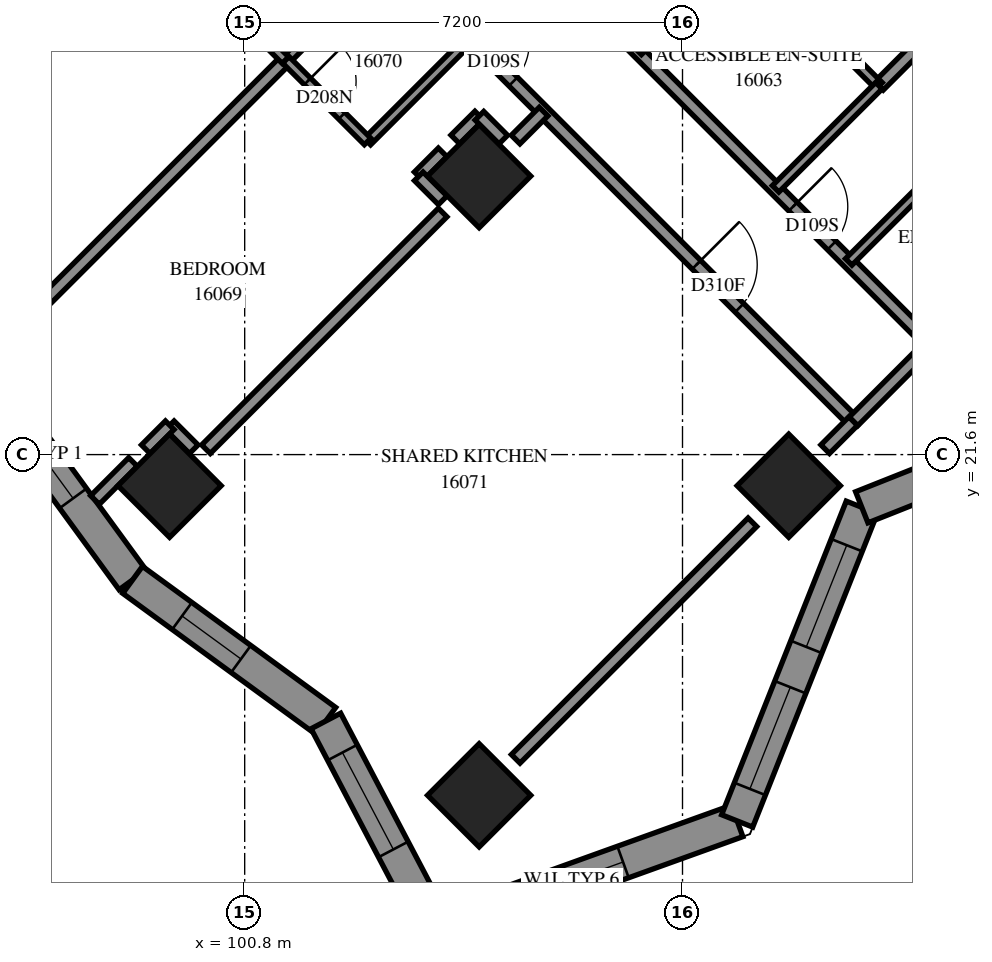
"""IFC4 building model, lengths in metres.
Left out: names, types, materials, properties, quantities, classifications, styles, units other than length and angle.
Written with IfcOpenShell. Run it as: python <this file> out.ifc"""

import sys

from ifc_helpers import new_model, si_unit, direction, frame, frame_2d, origin, origin_2d, place, context, subcontext, project, spatial, polyline, rectangle, outline, extrude, element, fill, save


model = new_model("IFC4")
c1 = context("Model", 3, precision=1e-05, world=origin(), true_north=direction((0.0, 1.0)))
c2 = subcontext(c1, "Body", "Model", "MODEL_VIEW")
j1 = project(units=[si_unit("LENGTHUNIT", "METRE"), si_unit("PLANEANGLEUNIT", "RADIAN")], contexts=[c1])
p1 = place(None, origin())
s1 = spatial("IfcSite", under=j1, at=p1, CompositionType="ELEMENT")
p2 = place(p1, origin())
s2 = spatial("IfcBuilding", under=s1, at=p2, CompositionType="ELEMENT")
p3 = place(p2, frame((0.0, 0.0, 61.0)))
s3 = spatial("IfcBuildingStorey", under=s2, at=p3, CompositionType="ELEMENT", Elevation=61.0)
for number, where, z_axis, x_axis in (
    (1, (104.656, 26.18, 0.0), (0.0, 0.0, 1.0), (0.707, -0.707, 0.0)),
    (2, (99.565, 21.088, 0.0), (0.0, 0.0, 1.0), (0.707, -0.707, 0.0)),
    (3, (109.747, 21.088, 0.0), (0.0, 0.0, 1.0), (0.707, -0.707, 0.0)),
    (4, (104.656, 15.997, 0.0), (0.0, 0.0, 1.0), (0.707, -0.707, 0.0)),
):
    element("IfcColumn", number, at=place(p3, frame(where, z_axis=z_axis, x_axis=x_axis)), inside=s3, PredefinedType="COLUMN", context=c2, shape_type="SweptSolid", body=[
        extrude(rectangle(XDim=1.2, YDim=1.2, at=origin_2d()), origin(), (0.0, 0.0, 1.0), 3.1),
    ])
p4 = place(p3, frame((103.937, 13.789, 0.0), z_axis=(0.0, 0.0, 1.0), x_axis=(0.9408704904, 0.3387664688, 0.0)))
e5 = element("IfcWall", 5, at=p4, inside=s3, PredefinedType="SOLIDWALL", context=c2, shape_type="SweptSolid", body=[
    extrude(outline(polyline([(-0.239, -0.275), (5.398, -0.275), (5.15, 0.275), (0.239, 0.275), (-0.239, -0.275)])), origin(), (0.0, 0.0, 1.0), 2.6),
])
p5 = place(p4, frame((1.479, 0.0, 0.6)))
e6 = element("IfcOpeningElement", 6, at=p5, cuts=e5, PredefinedType="OPENING", context=c2, shape_type="SweptSolid", body=[
    extrude(rectangle(XDim=1.8, YDim=1.9, at=frame_2d((0.9, 0.95))), frame((0.0, 0.285, 0.0), z_axis=(0.0, -1.0, 0.0), x_axis=(1.0, 0.0, 0.0)), (0.0, 0.0, 1.0), 0.57),
])
p6 = place(p3, frame((108.899, 15.576, 0.0), z_axis=(0.0, 0.0, 1.0), x_axis=(0.3692522262, 0.9293292169, 0.0)))
e7 = element("IfcWall", 7, at=p6, inside=s3, PredefinedType="SOLIDWALL", context=c2, shape_type="SweptSolid", body=[
    extrude(outline(polyline([(-0.124, -0.275), (5.431, -0.275), (5.668, 0.275), (0.124, 0.275), (-0.124, -0.275)])), origin(), (0.0, 0.0, 1.0), 3.1),
])
p7 = place(p6, frame((0.566, 0.0, 0.6)))
e8 = element("IfcOpeningElement", 8, at=p7, cuts=e7, PredefinedType="OPENING", context=c2, shape_type="SweptSolid", body=[
    extrude(rectangle(XDim=1.8, YDim=1.9, at=frame_2d((0.9, 0.95))), frame((0.0, 0.285, 0.0), z_axis=(0.0, -1.0, 0.0), x_axis=(1.0, 0.0, 0.0)), (0.0, 0.0, 1.0), 0.57),
])
p8 = place(p6, frame((3.079, 0.0, 0.6)))
e9 = element("IfcOpeningElement", 9, at=p8, cuts=e7, PredefinedType="OPENING", context=c2, shape_type="SweptSolid", body=[
    extrude(rectangle(XDim=1.8, YDim=1.9, at=frame_2d((0.9, 0.95))), frame((0.0, 0.285, 0.0), z_axis=(0.0, -1.0, 0.0), x_axis=(1.0, 0.0, 0.0)), (0.0, 0.0, 1.0), 0.57),
])
p9 = place(p3, frame((110.948, 20.733, 0.0), z_axis=(0.0, 0.0, 1.0), x_axis=(0.9293292169, 0.3692522262, 0.0)))
e10 = element("IfcWall", 10, at=p9, inside=s3, PredefinedType="SOLIDWALL", context=c2, shape_type="SweptSolid", body=[
    extrude(outline(polyline([(0.119, -0.275), (5.674, -0.275), (5.426, 0.275), (-0.119, 0.275), (0.119, -0.275)])), origin(), (0.0, 0.0, 1.0), 3.1),
])
p10 = place(p9, frame((1.238, 0.0, 0.5)))
e11 = element("IfcOpeningElement", 11, at=p10, cuts=e10, PredefinedType="OPENING", context=c2, shape_type="SweptSolid", body=[
    extrude(rectangle(XDim=2.8, YDim=2.45, at=frame_2d((1.4, 1.225))), frame((0.0, 0.285, 0.0), z_axis=(0.0, -1.0, 0.0), x_axis=(1.0, 0.0, 0.0)), (0.0, 0.0, 1.0), 0.57),
])
p11 = place(p3, frame((96.648, 22.701, 0.0), z_axis=(0.0, 0.0, 1.0), x_axis=(0.5897321582, -0.807598899, 0.0)))
e12 = element("IfcWall", 12, at=p11, inside=s3, PredefinedType="SOLIDWALL", context=c2, shape_type="SweptSolid", body=[
    extrude(outline(polyline([(0.043, -0.275), (3.957, -0.275), (3.871, 0.275), (-0.043, 0.275), (0.043, -0.275)])), origin(), (0.0, 0.0, 1.0), 3.1),
])
p12 = place(p11, frame((0.455, 0.0, 0.7)))
e13 = element("IfcOpeningElement", 13, at=p12, cuts=e12, PredefinedType="OPENING", context=c2, shape_type="SweptSolid", body=[
    extrude(rectangle(XDim=1.8, YDim=2.2, at=frame_2d((0.9, 1.1))), frame((0.0, 0.285, 0.0), z_axis=(0.0, -1.0, 0.0), x_axis=(1.0, 0.0, 0.0)), (0.0, 0.0, 1.0), 0.57),
])
p13 = place(p3, frame((98.957, 19.54, 0.0), z_axis=(0.0, 0.0, 1.0), x_axis=(0.8076038454, -0.5897253843, 0.0)))
e14 = element("IfcWall", 14, at=p13, inside=s3, PredefinedType="SOLIDWALL", context=c2, shape_type="SweptSolid", body=[
    extrude(outline(polyline([(-0.043, -0.275), (3.871, -0.275), (3.999, 0.275), (0.043, 0.275), (-0.043, -0.275)])), origin(), (0.0, 0.0, 1.0), 3.1),
])
p14 = place(p13, frame((1.007, 0.0, 0.5)))
e15 = element("IfcOpeningElement", 15, at=p14, cuts=e14, PredefinedType="OPENING", context=c2, shape_type="SweptSolid", body=[
    extrude(rectangle(XDim=1.2, YDim=2.45, at=frame_2d((0.6, 1.225))), frame((0.0, 0.285, 0.0), z_axis=(0.0, -1.0, 0.0), x_axis=(1.0, 0.0, 0.0)), (0.0, 0.0, 1.0), 0.57),
])
p15 = place(p3, frame((102.135, 17.219, 0.0), z_axis=(0.0, 0.0, 1.0), x_axis=(0.4651676913, -0.8852225816, 0.0)))
e16 = element("IfcWall", 16, at=p15, inside=s3, PredefinedType="SOLIDWALL", context=c2, shape_type="SweptSolid", body=[
    extrude(outline(polyline([(0.064, -0.275), (4.114, -0.275), (3.635, 0.275), (-0.064, 0.275), (0.064, -0.275)])), origin(), (0.0, 0.0, 1.0), 2.6),
])
p16 = place(p15, frame((0.586, 0.0, 0.6)))
e17 = element("IfcOpeningElement", 17, at=p16, cuts=e16, PredefinedType="OPENING", context=c2, shape_type="SweptSolid", body=[
    extrude(rectangle(XDim=1.8, YDim=1.9, at=frame_2d((0.9, 0.95))), frame((0.0, 0.285, 0.0), z_axis=(0.0, -1.0, 0.0), x_axis=(1.0, 0.0, 0.0)), (0.0, 0.0, 1.0), 0.57),
])
p17 = place(p3, frame((101.825, 31.125, 0.0), z_axis=(0.0, 0.0, 1.0), x_axis=(0.7071067812, -0.7071067812, 0.0)))
e18 = element("IfcWall", 18, at=p17, inside=s3, PredefinedType="PARTITIONING", context=c2, shape_type="SweptSolid", body=[
    extrude(rectangle(XDim=12.7, YDim=0.2, at=frame_2d((6.35, 0.0))), origin(), (0.0, 0.0, 1.0), 3.1),
])
p18 = place(p17, frame((3.895, 0.0, 0.0)))
e19 = element("IfcOpeningElement", 19, at=p18, cuts=e18, PredefinedType="OPENING", context=c2, shape_type="SweptSolid", body=[
    extrude(rectangle(XDim=0.9, YDim=2.1, at=frame_2d((0.45, 1.05))), frame((0.0, 0.11, 0.0), z_axis=(0.0, -1.0, 0.0), x_axis=(1.0, 0.0, 0.0)), (0.0, 0.0, 1.0), 0.22),
])
p19 = place(p17, frame((9.056, 0.0, 0.0)))
e20 = element("IfcOpeningElement", 20, at=p19, cuts=e18, PredefinedType="OPENING", context=c2, shape_type="SweptSolid", body=[
    extrude(rectangle(XDim=1.0, YDim=2.1, at=frame_2d((0.5, 1.05))), frame((0.0, 0.11, 0.0), z_axis=(0.0, -1.0, 0.0), x_axis=(1.0, 0.0, 0.0)), (0.0, 0.0, 1.0), 0.22),
])
p20 = place(p3, frame((106.987, 28.509, 0.0), z_axis=(0.0, 0.0, 1.0), x_axis=(0.7071067812, -0.7071067812, 0.0)))
e21 = element("IfcWall", 21, at=p20, inside=s3, PredefinedType="PARTITIONING", context=c2, shape_type="SweptSolid", body=[
    extrude(rectangle(XDim=7.198, YDim=0.2, at=frame_2d((3.599, 0.0))), origin(), (0.0, 0.0, 1.0), 3.1),
])
p21 = place(p20, frame((4.004, 0.0, 0.0)))
e22 = element("IfcOpeningElement", 22, at=p21, cuts=e21, PredefinedType="OPENING", context=c2, shape_type="SweptSolid", body=[
    extrude(rectangle(XDim=0.9, YDim=2.1, at=frame_2d((0.45, 1.05))), frame((0.0, 0.11, 0.0), z_axis=(0.0, -1.0, 0.0), x_axis=(1.0, 0.0, 0.0)), (0.0, 0.0, 1.0), 0.22),
])
p22 = place(p3, frame((96.519, 23.136, 0.0), z_axis=(0.0, 0.0, 1.0), x_axis=(0.7071067812, 0.7071067812, 0.0)))
e23 = element("IfcWall", 23, at=p22, inside=s3, PredefinedType="PARTITIONING", context=c2, shape_type="SweptSolid", body=[
    extrude(rectangle(XDim=7.005, YDim=0.2, at=frame_2d((3.503, 0.0))), origin(), (0.0, 0.0, 1.0), 3.1),
])
p23 = place(p3, frame((100.163, 21.689, 0.0), z_axis=(0.0, 0.0, 1.0), x_axis=(0.7071067812, 0.7071067812, 0.0)))
e24 = element("IfcWall", 24, at=p23, inside=s3, PredefinedType="PARTITIONING", context=c2, shape_type="SweptSolid", body=[
    extrude(rectangle(XDim=5.504, YDim=0.2, at=frame_2d((2.752, 0.0))), origin(), (0.0, 0.0, 1.0), 3.1),
])
p24 = place(p3, frame((105.257, 16.597, 0.0), z_axis=(0.0, 0.0, 1.0), x_axis=(0.7072884866, 0.706925029, 0.0)))
e25 = element("IfcWall", 25, at=p24, inside=s3, PredefinedType="PARTITIONING", context=c2, shape_type="SweptSolid", body=[
    extrude(rectangle(XDim=5.503, YDim=0.2, at=frame_2d((2.751, 0.0))), origin(), (0.0, 0.0, 1.0), 2.6),
])
p25 = place(p3, frame((111.231, 27.665, 0.0), z_axis=(0.0, 0.0, 1.0), x_axis=(0.7071067812, 0.7071067812, 0.0)))
e26 = element("IfcWall", 26, at=p25, inside=s3, PredefinedType="PARTITIONING", context=c2, shape_type="SweptSolid", body=[
    extrude(rectangle(XDim=4.55, YDim=0.2, at=frame_2d((2.275, 0.0))), origin(), (0.0, 0.0, 1.0), 3.1),
])
p26 = place(p3, frame((108.97, 29.928, 0.0), z_axis=(0.0, 0.0, 1.0), x_axis=(0.7067942478, -0.7074191764, 0.0)))
e27 = element("IfcWall", 27, at=p26, inside=s3, PredefinedType="PARTITIONING", context=c2, shape_type="SweptSolid", body=[
    extrude(rectangle(XDim=3.2, YDim=0.15, at=frame_2d((1.6, 0.0))), origin(), (0.0, 0.0, 1.0), 3.1),
])
p27 = place(p26, frame((1.148, 0.0, 0.0)))
e28 = element("IfcOpeningElement", 28, at=p27, cuts=e27, PredefinedType="OPENING", context=c2, shape_type="SweptSolid", body=[
    extrude(rectangle(XDim=0.8, YDim=2.1, at=frame_2d((0.4, 1.05))), frame((0.0, 0.085, 0.0), z_axis=(0.0, -1.0, 0.0), x_axis=(1.0, 0.0, 0.0)), (0.0, 0.0, 1.0), 0.17),
])
p28 = place(p3, frame((107.271, 28.231, 0.0), z_axis=(0.0, 0.0, 1.0), x_axis=(0.7071067812, 0.7071067812, 0.0)))
e29 = element("IfcWall", 29, at=p28, inside=s3, PredefinedType="PARTITIONING", context=c2, shape_type="SweptSolid", body=[
    extrude(rectangle(XDim=2.401, YDim=0.15, at=frame_2d((1.201, 0.0))), origin(), (0.0, 0.0, 1.0), 3.1),
])
for number, where, z_axis, x_axis in (
    (30, (101.477, 28.085, 0.0), (0.0, 0.0, 1.0), (0.707, 0.708, 0.0)),
    (31, (109.531, 25.971, 0.0), (0.0, 0.0, 1.0), (0.708, 0.707, 0.0)),
    (32, (110.734, 24.768, 0.0), (0.0, 0.0, 1.0), (0.708, 0.707, 0.0)),
):
    element("IfcWall", number, at=place(p3, frame(where, z_axis=z_axis, x_axis=x_axis)), inside=s3, PredefinedType="PARTITIONING", context=c2, shape_type="SweptSolid", body=[
        extrude(rectangle(XDim=2.4, YDim=0.15, at=frame_2d((1.2, 0.0))), origin(), (0.0, 0.0, 1.0), 3.1),
    ])
p29 = place(p3, frame((102.817, 26.747, 0.0), z_axis=(0.0, 0.0, 1.0), x_axis=(0.7071067812, 0.7071067812, 0.0)))
e33 = element("IfcWall", 33, at=p29, inside=s3, PredefinedType="PARTITIONING", context=c2, shape_type="SweptSolid", body=[
    extrude(rectangle(XDim=2.398, YDim=0.15, at=frame_2d((1.199, 0.0))), origin(), (0.0, 0.0, 1.0), 3.1),
])
p30 = place(p3, frame((100.127, 29.429, 0.0), z_axis=(0.0, 0.0, 1.0), x_axis=(0.7071067812, -0.7071067812, 0.0)))
e34 = element("IfcWall", 34, at=p30, inside=s3, PredefinedType="PARTITIONING", context=c2, shape_type="SweptSolid", body=[
    extrude(rectangle(XDim=1.901, YDim=0.15, at=frame_2d((0.95, 0.0))), origin(), (0.0, 0.0, 1.0), 3.1),
])
p31 = place(p30, frame((0.508, 0.0, 0.0)))
e35 = element("IfcOpeningElement", 35, at=p31, cuts=e34, PredefinedType="OPENING", context=c2, shape_type="SweptSolid", body=[
    extrude(rectangle(XDim=0.8, YDim=2.1, at=frame_2d((0.4, 1.05))), frame((0.0, 0.085, 0.0), z_axis=(0.0, -1.0, 0.0), x_axis=(1.0, 0.0, 0.0)), (0.0, 0.0, 1.0), 0.17),
])
p32 = place(p3, frame((101.477, 28.091, 0.0), z_axis=(0.0, 0.0, 1.0), x_axis=(0.7076330979, -0.7065800724, 0.0)))
e36 = element("IfcWall", 36, at=p32, inside=s3, PredefinedType="PARTITIONING", context=c2, shape_type="SweptSolid", body=[
    extrude(rectangle(XDim=1.899, YDim=0.15, at=frame_2d((0.95, 0.0))), origin(), (0.0, 0.0, 1.0), 3.1),
])
p33 = place(p32, frame((0.501, 0.0, 0.0)))
e37 = element("IfcOpeningElement", 37, at=p33, cuts=e36, PredefinedType="OPENING", context=c2, shape_type="SweptSolid", body=[
    extrude(rectangle(XDim=0.8, YDim=2.1, at=frame_2d((0.4, 1.05))), frame((0.0, 0.085, 0.0), z_axis=(0.0, -1.0, 0.0), x_axis=(1.0, 0.0, 0.0)), (0.0, 0.0, 1.0), 0.17),
])
p34 = place(p3, frame((110.811, 22.145, 0.0), z_axis=(0.0, 0.0, 1.0), x_axis=(0.7065510983, 0.7076620277, 0.0)))
e38 = element("IfcWall", 38, at=p34, inside=s3, PredefinedType="PARTITIONING", context=c2, shape_type="SweptSolid", body=[
    extrude(rectangle(XDim=1.8, YDim=0.2, at=frame_2d((0.9, 0.0))), origin(), (0.0, 0.0, 1.0), 2.6),
])
p35 = place(p3, frame((98.338, 20.853, 0.0), z_axis=(0.0, 0.0, 1.0), x_axis=(0.7071067812, 0.7071067812, 0.0)))
e39 = element("IfcWall", 39, at=p35, inside=s3, PredefinedType="PARTITIONING", context=c2, shape_type="SweptSolid", body=[
    extrude(rectangle(XDim=0.884, YDim=0.2, at=frame_2d((0.442, 0.0))), origin(), (0.0, 0.0, 1.0), 3.1),
])
p36 = place(p3, frame((110.347, 21.689, 0.0), z_axis=(0.0, 0.0, 1.0), x_axis=(0.7071067812, 0.7071067812, 0.0)))
e40 = element("IfcWall", 40, at=p36, inside=s3, PredefinedType="PARTITIONING", context=c2, shape_type="SweptSolid", body=[
    extrude(rectangle(XDim=0.65, YDim=0.2, at=frame_2d((0.325, 0.0))), origin(), (0.0, 0.0, 1.0), 2.6),
])
p37 = place(p3, frame((105.255, 26.781, 0.0), z_axis=(0.0, 0.0, 1.0), x_axis=(0.7071067812, 0.7071067812, 0.0)))
e41 = element("IfcWall", 41, at=p37, inside=s3, PredefinedType="PARTITIONING", context=c2, shape_type="SweptSolid", body=[
    extrude(rectangle(XDim=0.65, YDim=0.2, at=frame_2d((0.325, 0.0))), origin(), (0.0, 0.0, 1.0), 3.1),
])
for number, where, z_axis, x_axis in (
    (42, (99.568, 22.082, 0.0), (0.0, 0.0, 1.0), (0.707, -0.707, 0.0)),
    (43, (99.173, 21.689, 0.0), (0.0, 0.0, 1.0), (0.707, 0.707, 0.0)),
    (44, (103.661, 26.177, 0.0), (0.0, 0.0, 1.0), (0.707, 0.707, 0.0)),
    (45, (103.662, 26.177, 0.0), (0.0, 0.0, 1.0), (0.707, -0.707, 0.0)),
):
    element("IfcWall", number, at=place(p3, frame(where, z_axis=z_axis, x_axis=x_axis)), inside=s3, PredefinedType="PARTITIONING", context=c2, shape_type="SweptSolid", body=[
        extrude(rectangle(XDim=0.557, YDim=0.2, at=frame_2d((0.279, 0.0))), origin(), (0.0, 0.0, 1.0), 3.1),
    ])
p38 = place(p3, frame((104.263, 26.784, 0.0), z_axis=(0.0, 0.0, 1.0), x_axis=(0.7089037401, 0.705305244, 0.0)))
e46 = element("IfcWall", 46, at=p38, inside=s3, PredefinedType="PARTITIONING", context=c2, shape_type="SweptSolid", body=[
    extrude(rectangle(XDim=0.556, YDim=0.2, at=frame_2d((0.278, 0.0))), origin(), (0.0, 0.0, 1.0), 3.1),
])
p39 = place(p3, frame((104.66, 27.172, 0.0), z_axis=(0.0, 0.0, 1.0), x_axis=(0.7071067812, -0.7071067812, 0.0)))
e47 = element("IfcWall", 47, at=p39, inside=s3, PredefinedType="PARTITIONING", context=c2, shape_type="SweptSolid", body=[
    extrude(rectangle(XDim=0.554, YDim=0.2, at=frame_2d((0.277, 0.0))), origin(), (0.0, 0.0, 1.0), 3.1),
])
p40 = place(p5, origin())
e48 = element("IfcWindow", 48, at=p40, inside=s3, PartitioningType="SINGLE_PANEL", PredefinedType="WINDOW", context=c2, shape_type="SweptSolid", body=[
    extrude(rectangle(XDim=1.8, YDim=1.9, at=frame_2d((0.9, 0.95))), frame((0.0, 0.155, 0.0), z_axis=(0.0, -1.0, 0.0), x_axis=(1.0, 0.0, 0.0)), (0.0, 0.0, 1.0), 0.06),
])
fill(e6, e48)
p41 = place(p7, origin())
e49 = element("IfcWindow", 49, at=p41, inside=s3, PartitioningType="SINGLE_PANEL", PredefinedType="WINDOW", context=c2, shape_type="SweptSolid", body=[
    extrude(rectangle(XDim=1.8, YDim=1.9, at=frame_2d((0.9, 0.95))), frame((0.0, 0.155, 0.0), z_axis=(0.0, -1.0, 0.0), x_axis=(1.0, 0.0, 0.0)), (0.0, 0.0, 1.0), 0.06),
])
fill(e8, e49)
p42 = place(p8, origin())
e50 = element("IfcWindow", 50, at=p42, inside=s3, PartitioningType="SINGLE_PANEL", PredefinedType="WINDOW", context=c2, shape_type="SweptSolid", body=[
    extrude(rectangle(XDim=1.8, YDim=1.9, at=frame_2d((0.9, 0.95))), frame((0.0, 0.155, 0.0), z_axis=(0.0, -1.0, 0.0), x_axis=(1.0, 0.0, 0.0)), (0.0, 0.0, 1.0), 0.06),
])
fill(e9, e50)
p43 = place(p14, origin())
e51 = element("IfcWindow", 51, at=p43, inside=s3, PartitioningType="SINGLE_PANEL", PredefinedType="WINDOW", context=c2, shape_type="SweptSolid", body=[
    extrude(rectangle(XDim=1.2, YDim=2.45, at=frame_2d((0.6, 1.225))), frame((0.0, 0.155, 0.0), z_axis=(0.0, -1.0, 0.0), x_axis=(1.0, 0.0, 0.0)), (0.0, 0.0, 1.0), 0.06),
])
fill(e15, e51)
p44 = place(p16, origin())
e52 = element("IfcWindow", 52, at=p44, inside=s3, PartitioningType="SINGLE_PANEL", PredefinedType="WINDOW", context=c2, shape_type="SweptSolid", body=[
    extrude(rectangle(XDim=1.8, YDim=1.9, at=frame_2d((0.9, 0.95))), frame((0.0, 0.155, 0.0), z_axis=(0.0, -1.0, 0.0), x_axis=(1.0, 0.0, 0.0)), (0.0, 0.0, 1.0), 0.06),
])
fill(e17, e52)
p45 = place(p18, origin())
e53 = element("IfcDoor", 53, at=p45, inside=s3, OperationType="SINGLE_SWING_LEFT", PredefinedType="DOOR", context=c2, shape_type="SweptSolid", body=[
    extrude(rectangle(XDim=0.9, YDim=2.1, at=frame_2d((0.45, 1.05))), frame((0.0, 0.025, 0.0), z_axis=(0.0, -1.0, 0.0), x_axis=(1.0, 0.0, 0.0)), (0.0, 0.0, 1.0), 0.05),
])
fill(e19, e53)
p46 = place(p33, origin())
e54 = element("IfcDoor", 54, at=p46, inside=s3, OperationType="SINGLE_SWING_RIGHT", PredefinedType="DOOR", context=c2, shape_type="SweptSolid", body=[
    extrude(rectangle(XDim=0.8, YDim=2.1, at=frame_2d((0.4, 1.05))), frame((0.0, 0.025, 0.0), z_axis=(0.0, -1.0, 0.0), x_axis=(1.0, 0.0, 0.0)), (0.0, 0.0, 1.0), 0.05),
])
fill(e37, e54)
p47 = place(p19, origin())
e55 = element("IfcDoor", 55, at=p47, inside=s3, OperationType="SINGLE_SWING_RIGHT", PredefinedType="DOOR", context=c2, shape_type="SweptSolid", body=[
    extrude(rectangle(XDim=1.0, YDim=2.1, at=frame_2d((0.5, 1.05))), frame((0.0, 0.025, 0.0), z_axis=(0.0, -1.0, 0.0), x_axis=(1.0, 0.0, 0.0)), (0.0, 0.0, 1.0), 0.05),
])
fill(e20, e55)
p48 = place(p21, origin())
e56 = element("IfcDoor", 56, at=p48, inside=s3, OperationType="SINGLE_SWING_RIGHT", PredefinedType="DOOR", context=c2, shape_type="SweptSolid", body=[
    extrude(rectangle(XDim=0.9, YDim=2.1, at=frame_2d((0.45, 1.05))), frame((0.0, 0.025, 0.0), z_axis=(0.0, -1.0, 0.0), x_axis=(1.0, 0.0, 0.0)), (0.0, 0.0, 1.0), 0.05),
])
fill(e22, e56)
p49 = place(p12, origin())
e57 = element("IfcWindow", 57, at=p49, inside=s3, PartitioningType="SINGLE_PANEL", PredefinedType="WINDOW", context=c2, shape_type="SweptSolid", body=[
    extrude(rectangle(XDim=1.8, YDim=2.2, at=frame_2d((0.9, 1.1))), frame((0.0, 0.155, 0.0), z_axis=(0.0, -1.0, 0.0), x_axis=(1.0, 0.0, 0.0)), (0.0, 0.0, 1.0), 0.06),
])
fill(e13, e57)
save(model, sys.argv[1])
